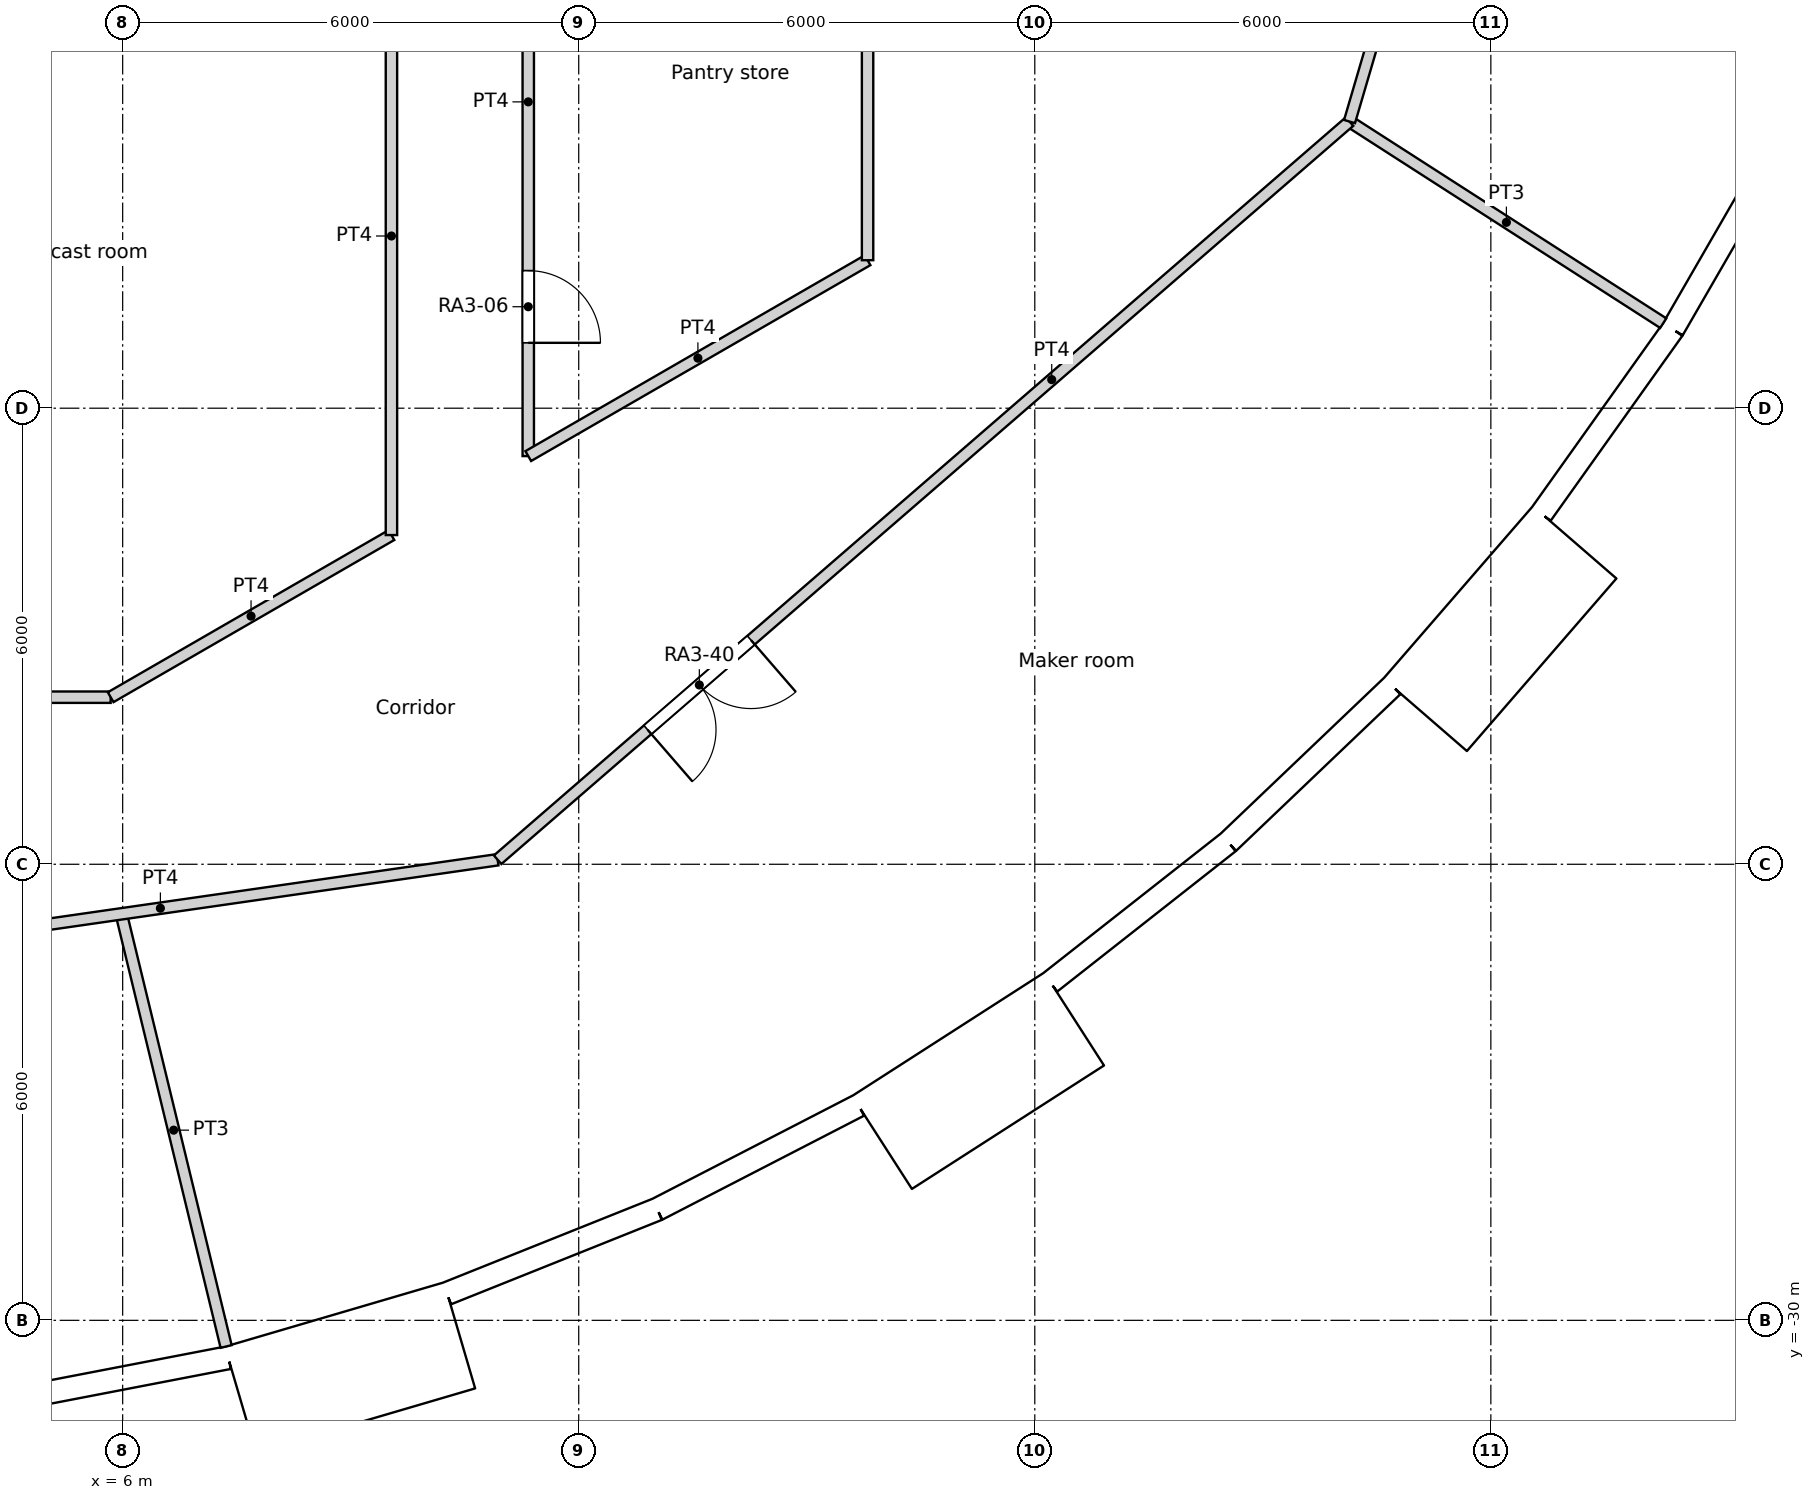
"""IFC4 building model, lengths in metres.
Left out: names, types, materials, properties, quantities, classifications, styles, units other than length and angle.
Written with IfcOpenShell. Run it as: python <this file> out.ifc"""

import sys

from ifc_helpers import new_model, si_unit, direction, frame, frame_2d, origin, origin_2d, place, context, subcontext, project, spatial, rectangle, circle, extrude, element, fill, save


model = new_model("IFC4")
c1 = context("Model", 3, precision=1e-05, world=origin(), true_north=direction((0.0, 1.0)))
c2 = subcontext(c1, "Body", "Model", "MODEL_VIEW")
j1 = project(units=[si_unit("LENGTHUNIT", "METRE"), si_unit("PLANEANGLEUNIT", "RADIAN")], contexts=[c1])
p1 = place(None, origin())
s1 = spatial("IfcSite", under=j1, at=p1, CompositionType="ELEMENT")
p2 = place(p1, origin())
s2 = spatial("IfcBuilding", under=s1, at=p2, CompositionType="ELEMENT")
p3 = place(p2, frame((0.0, 0.0, 49.8)))
s3 = spatial("IfcBuildingStorey", under=s2, at=p3, CompositionType="ELEMENT", Elevation=49.8)
for number, where, z_axis, x_axis in (
    (1, (7.137, -29.421, 0.0), (0.0, 0.0, 1.0), (1.0, 0.0, 0.0)),
    (2, (12.576, -27.539, 0.0), (0.0, 0.0, 1.0), (1.0, 0.0, 0.0)),
    (3, (17.561, -24.661, 0.0), (0.0, 0.0, 1.0), (1.0, 0.0, 0.0)),
    (4, (21.911, -20.892, 0.0), (0.0, 0.0, 1.0), (1.0, 0.0, 0.0)),
    (5, (25.469, -16.368, 0.0), (0.0, 0.0, 1.0), (1.0, 0.0, 0.0)),
):
    element("IfcColumn", number, at=place(p3, frame(where, z_axis=z_axis, x_axis=x_axis)), inside=s3, PredefinedType="COLUMN", context=c2, shape_type="SweptSolid", body=[
        extrude(circle(Radius=0.7, at=origin_2d()), origin(), (0.0, 0.0, 1.0), 3.6),
    ])
for number, where, z_axis, x_axis in (
    (6, (9.723, -22.54, 0.0), (0.0, 0.0, 1.0), (1.0, 0.0, 0.0)),
    (7, (14.659, -19.69, 0.0), (0.0, 0.0, 1.0), (1.0, 0.0, 0.0)),
    (8, (18.805, -15.779, 0.0), (0.0, 0.0, 1.0), (1.0, 0.0, 0.0)),
):
    element("IfcColumn", number, at=place(p3, frame(where, z_axis=z_axis, x_axis=x_axis)), inside=s3, PredefinedType="COLUMN", context=c2, shape_type="SweptSolid", body=[
        extrude(circle(Radius=0.75, at=origin_2d()), origin(), (0.0, 0.0, 1.0), 3.6),
    ])
for number, where, z_axis, x_axis in (
    (9, (6.876, -17.521, 0.0), (0.0, 0.0, 1.0), (1.0, 0.0, 0.0)),
    (10, (11.735, -14.716, 0.0), (0.0, 0.0, 1.0), (1.0, 0.0, 0.0)),
):
    element("IfcColumn", number, at=place(p3, frame(where, z_axis=z_axis, x_axis=x_axis)), inside=s3, PredefinedType="COLUMN", context=c2, shape_type="SweptSolid", body=[
        extrude(circle(Radius=0.8, at=origin_2d()), origin(), (0.0, 0.0, 1.0), 3.6),
    ])
p4 = place(p3, frame((4.465, -31.055, 0.0), z_axis=(0.0, 0.0, 1.0), x_axis=(0.981924535406, 0.189272836848, 0.0)))
e11 = element("IfcWall", 11, at=p4, inside=s3, PredefinedType="SOLIDWALL", context=c2, shape_type="SweptSolid", body=[
    extrude(rectangle(XDim=2.98, YDim=0.3, at=frame_2d((1.49, 0.0))), origin(), (0.0, 0.0, 1.0), 3.15),
])
p5 = place(p4, frame((1.49, 0.0, 1.55)))
e12 = element("IfcOpeningElement", 12, at=p5, cuts=e11, PredefinedType="OPENING", context=c2, shape_type="SweptSolid", body=[
    extrude(circle(Radius=0.9, at=origin_2d()), frame((0.0, 0.16, 0.0), z_axis=(0.0, -1.0, 0.0), x_axis=(1.0, 0.0, 0.0)), (0.0, 0.0, 1.0), 0.32),
])
p6 = place(p3, frame((7.552, -31.044, -0.45), z_axis=(0.0, 0.0, 1.0), x_axis=(0.959489813418, 0.281743319258, 0.0)))
e13 = element("IfcWall", 13, at=p6, inside=s3, PredefinedType="ELEMENTEDWALL", context=c2, shape_type="SweptSolid", body=[
    extrude(rectangle(XDim=3.0, YDim=1.45, at=frame_2d((1.5, 0.0))), origin(), (0.0, 0.0, 1.0), 3.6),
])
p7 = place(p6, frame((1.5, 0.0, 2.0)))
e14 = element("IfcOpeningElement", 14, at=p7, cuts=e13, PredefinedType="OPENING", context=c2, shape_type="SweptSolid", body=[
    extrude(circle(Radius=0.9, at=origin_2d()), frame((0.0, 0.735, 0.0), z_axis=(0.0, -1.0, 0.0), x_axis=(1.0, 0.0, 0.0)), (0.0, 0.0, 1.0), 1.47),
])
p8 = place(p3, frame((10.267, -29.646, 0.0), z_axis=(0.0, 0.0, 1.0), x_axis=(0.928403213937, 0.371574316054, 0.0)))
e15 = element("IfcWall", 15, at=p8, inside=s3, PredefinedType="SOLIDWALL", context=c2, shape_type="SweptSolid", body=[
    extrude(rectangle(XDim=2.98, YDim=0.3, at=frame_2d((1.49, 0.0))), origin(), (0.0, 0.0, 1.0), 3.15),
])
p9 = place(p8, frame((1.49, 0.0, 1.55)))
e16 = element("IfcOpeningElement", 16, at=p9, cuts=e15, PredefinedType="OPENING", context=c2, shape_type="SweptSolid", body=[
    extrude(circle(Radius=0.9, at=origin_2d()), frame((0.0, 0.16, 0.0), z_axis=(0.0, -1.0, 0.0), x_axis=(1.0, 0.0, 0.0)), (0.0, 0.0, 1.0), 0.32),
])
p10 = place(p3, frame((13.033, -28.539, 0.0), z_axis=(0.0, 0.0, 1.0), x_axis=(0.888819853856, 0.458256770153, 0.0)))
e17 = element("IfcWall", 17, at=p10, inside=s3, PredefinedType="SOLIDWALL", context=c2, shape_type="SweptSolid", body=[
    extrude(rectangle(XDim=2.98, YDim=0.3, at=frame_2d((1.49, 0.0))), origin(), (0.0, 0.0, 1.0), 3.15),
])
p11 = place(p10, frame((1.49, 0.0, 1.55)))
e18 = element("IfcOpeningElement", 18, at=p11, cuts=e17, PredefinedType="OPENING", context=c2, shape_type="SweptSolid", body=[
    extrude(circle(Radius=0.9, at=origin_2d()), frame((0.0, 0.16, 0.0), z_axis=(0.0, -1.0, 0.0), x_axis=(1.0, 0.0, 0.0)), (0.0, 0.0, 1.0), 0.32),
])
p12 = place(p3, frame((15.992, -27.659, -0.45), z_axis=(0.0, 0.0, 1.0), x_axis=(0.841223422347, 0.540687667415, 0.0)))
e19 = element("IfcWall", 19, at=p12, inside=s3, PredefinedType="ELEMENTEDWALL", context=c2, shape_type="SweptSolid", body=[
    extrude(rectangle(XDim=3.0, YDim=1.45, at=frame_2d((1.5, 0.0))), origin(), (0.0, 0.0, 1.0), 3.6),
])
p13 = place(p12, frame((1.5, 0.0, 2.0)))
e20 = element("IfcOpeningElement", 20, at=p13, cuts=e19, PredefinedType="OPENING", context=c2, shape_type="SweptSolid", body=[
    extrude(circle(Radius=0.9, at=origin_2d()), frame((0.0, 0.735, 0.0), z_axis=(0.0, -1.0, 0.0), x_axis=(1.0, 0.0, 0.0)), (0.0, 0.0, 1.0), 1.47),
])
p14 = place(p3, frame((18.204, -25.553, 0.0), z_axis=(0.0, 0.0, 1.0), x_axis=(0.786045331304, 0.618168858108, 0.0)))
e21 = element("IfcWall", 21, at=p14, inside=s3, PredefinedType="SOLIDWALL", context=c2, shape_type="SweptSolid", body=[
    extrude(rectangle(XDim=2.98, YDim=0.3, at=frame_2d((1.49, 0.0))), origin(), (0.0, 0.0, 1.0), 3.15),
])
p15 = place(p14, frame((1.49, 0.0, 1.55)))
e22 = element("IfcOpeningElement", 22, at=p15, cuts=e21, PredefinedType="OPENING", context=c2, shape_type="SweptSolid", body=[
    extrude(circle(Radius=0.9, at=origin_2d()), frame((0.0, 0.16, 0.0), z_axis=(0.0, -1.0, 0.0), x_axis=(1.0, 0.0, 0.0)), (0.0, 0.0, 1.0), 0.32),
])
p16 = place(p3, frame((20.546, -23.711, 0.0), z_axis=(0.0, 0.0, 1.0), x_axis=(0.723744206617, 0.690068346896, 0.0)))
e23 = element("IfcWall", 23, at=p16, inside=s3, PredefinedType="SOLIDWALL", context=c2, shape_type="SweptSolid", body=[
    extrude(rectangle(XDim=2.98, YDim=0.3, at=frame_2d((1.49, 0.0))), origin(), (0.0, 0.0, 1.0), 3.15),
])
p17 = place(p16, frame((1.49, 0.0, 1.55)))
e24 = element("IfcOpeningElement", 24, at=p17, cuts=e23, PredefinedType="OPENING", context=c2, shape_type="SweptSolid", body=[
    extrude(circle(Radius=0.9, at=origin_2d()), frame((0.0, 0.16, 0.0), z_axis=(0.0, -1.0, 0.0), x_axis=(1.0, 0.0, 0.0)), (0.0, 0.0, 1.0), 0.32),
])
p18 = place(p3, frame((23.137, -22.033, -0.45), z_axis=(0.0, 0.0, 1.0), x_axis=(0.654890259022, 0.75572398972, 0.0)))
e25 = element("IfcWall", 25, at=p18, inside=s3, PredefinedType="ELEMENTEDWALL", context=c2, shape_type="SweptSolid", body=[
    extrude(rectangle(XDim=3.0, YDim=1.45, at=frame_2d((1.5, 0.0))), origin(), (0.0, 0.0, 1.0), 3.6),
])
p19 = place(p18, frame((1.5, 0.0, 2.0)))
e26 = element("IfcOpeningElement", 26, at=p19, cuts=e25, PredefinedType="OPENING", context=c2, shape_type="SweptSolid", body=[
    extrude(circle(Radius=0.9, at=origin_2d()), frame((0.0, 0.735, 0.0), z_axis=(0.0, -1.0, 0.0), x_axis=(1.0, 0.0, 0.0)), (0.0, 0.0, 1.0), 1.47),
])
p20 = place(p3, frame((24.666, -19.389, 0.0), z_axis=(0.0, 0.0, 1.0), x_axis=(0.580059407678, 0.81457417315, 0.0)))
e27 = element("IfcWall", 27, at=p20, inside=s3, PredefinedType="SOLIDWALL", context=c2, shape_type="SweptSolid", body=[
    extrude(rectangle(XDim=2.979, YDim=0.3, at=frame_2d((1.49, 0.0))), origin(), (0.0, 0.0, 1.0), 3.15),
])
p21 = place(p20, frame((1.49, 0.0, 1.55)))
e28 = element("IfcOpeningElement", 28, at=p21, cuts=e27, PredefinedType="OPENING", context=c2, shape_type="SweptSolid", body=[
    extrude(circle(Radius=0.9, at=origin_2d()), frame((0.0, 0.16, 0.0), z_axis=(0.0, -1.0, 0.0), x_axis=(1.0, 0.0, 0.0)), (0.0, 0.0, 1.0), 0.32),
])
p22 = place(p3, frame((26.394, -16.962, 0.0), z_axis=(0.0, 0.0, 1.0), x_axis=(0.500025049464, 0.866010940986, 0.0)))
e29 = element("IfcWall", 29, at=p22, inside=s3, PredefinedType="SOLIDWALL", context=c2, shape_type="SweptSolid", body=[
    extrude(rectangle(XDim=2.98, YDim=0.3, at=frame_2d((1.49, 0.0))), origin(), (0.0, 0.0, 1.0), 3.15),
])
p23 = place(p22, frame((1.49, 0.0, 1.55)))
e30 = element("IfcOpeningElement", 30, at=p23, cuts=e29, PredefinedType="OPENING", context=c2, shape_type="SweptSolid", body=[
    extrude(circle(Radius=0.9, at=origin_2d()), frame((0.0, 0.16, 0.0), z_axis=(0.0, -1.0, 0.0), x_axis=(1.0, 0.0, 0.0)), (0.0, 0.0, 1.0), 0.32),
])
p24 = place(p3, frame((15.8, -16.053, 0.0), z_axis=(0.0, 0.0, 1.0), x_axis=(0.0, 1.0, 0.0)))
e31 = element("IfcWall", 31, at=p24, inside=s3, PredefinedType="PARTITIONING", context=c2, shape_type="SweptSolid", body=[
    extrude(rectangle(XDim=6.057, YDim=0.15, at=frame_2d((3.028, 0.0))), origin(), (0.0, 0.0, 1.0), 3.15),
])
p25 = place(p3, frame((10.933, -23.94, 0.0), z_axis=(0.0, 0.0, 1.0), x_axis=(0.755770011705, 0.654837147242, 0.0)))
e32 = element("IfcWall", 32, at=p25, inside=s3, PredefinedType="PARTITIONING", context=c2, shape_type="SweptSolid", body=[
    extrude(rectangle(XDim=14.83, YDim=0.15, at=frame_2d((7.415, 0.0))), origin(), (0.0, 0.0, 1.0), 3.15),
])
p26 = place(p25, frame((2.611, 0.0, 0.0)))
e33 = element("IfcOpeningElement", 33, at=p26, cuts=e32, PredefinedType="OPENING", context=c2, shape_type="SweptSolid", body=[
    extrude(rectangle(XDim=1.8, YDim=2.1, at=frame_2d((0.9, 1.05))), frame((0.0, 0.075, 0.0), z_axis=(0.0, -1.0, 0.0), x_axis=(1.0, 0.0, 0.0)), (0.0, 0.0, 1.0), 0.15),
])
p27 = place(p3, frame((22.141, -14.229, 0.0), z_axis=(0.0, 0.0, 1.0), x_axis=(0.281730446162, 0.959493593363, 0.0)))
e34 = element("IfcWall", 34, at=p27, inside=s3, PredefinedType="PARTITIONING", context=c2, shape_type="SweptSolid", body=[
    extrude(rectangle(XDim=14.83, YDim=0.15, at=frame_2d((7.415, 0.0))), origin(), (0.0, 0.0, 1.0), 3.15),
])
p28 = place(p27, frame((6.515, 0.0, 0.0)))
e35 = element("IfcOpeningElement", 35, at=p28, cuts=e34, PredefinedType="OPENING", context=c2, shape_type="SweptSolid", body=[
    extrude(rectangle(XDim=1.0, YDim=2.04, at=frame_2d((0.5, 1.02))), frame((0.0, 0.075, 0.0), z_axis=(0.0, -1.0, 0.0), x_axis=(1.0, 0.0, 0.0)), (0.0, 0.0, 1.0), 0.15),
])
p29 = place(p3, frame((0.608, -21.802, 0.0), z_axis=(0.0, 0.0, 1.0), x_axis=(1.0, 0.0, 0.0)))
e36 = element("IfcWall", 36, at=p29, inside=s3, PredefinedType="PARTITIONING", context=c2, shape_type="SweptSolid", body=[
    extrude(rectangle(XDim=5.234, YDim=0.15, at=frame_2d((2.617, 0.0))), origin(), (0.0, 0.0, 1.0), 3.15),
])
p30 = place(p3, frame((5.842, -21.802, 0.0), z_axis=(0.0, 0.0, 1.0), x_axis=(0.865983505205, 0.500072563448, 0.0)))
e37 = element("IfcWall", 37, at=p30, inside=s3, PredefinedType="PARTITIONING", context=c2, shape_type="SweptSolid", body=[
    extrude(rectangle(XDim=4.265, YDim=0.15, at=frame_2d((2.133, 0.0))), origin(), (0.0, 0.0, 1.0), 3.15),
])
p31 = place(p3, frame((9.536, -19.669, 0.0), z_axis=(0.0, 0.0, 1.0), x_axis=(0.0, 1.0, 0.0)))
e38 = element("IfcWall", 38, at=p31, inside=s3, PredefinedType="PARTITIONING", context=c2, shape_type="SweptSolid", body=[
    extrude(rectangle(XDim=7.869, YDim=0.15, at=frame_2d((3.935, 0.0))), origin(), (0.0, 0.0, 1.0), 3.15),
])
p32 = place(p3, frame((11.336, -18.63, 0.0), z_axis=(0.0, 0.0, 1.0), x_axis=(0.0, 1.0, 0.0)))
e39 = element("IfcWall", 39, at=p32, inside=s3, PredefinedType="PARTITIONING", context=c2, shape_type="SweptSolid", body=[
    extrude(rectangle(XDim=6.83, YDim=0.15, at=frame_2d((3.415, 0.0))), origin(), (0.0, 0.0, 1.0), 3.15),
])
p33 = place(p32, frame((1.49, 0.0, 0.0)))
e40 = element("IfcOpeningElement", 40, at=p33, cuts=e39, PredefinedType="OPENING", context=c2, shape_type="SweptSolid", body=[
    extrude(rectangle(XDim=0.95, YDim=2.1, at=frame_2d((0.475, 1.05))), frame((0.0, 0.075, 0.0), z_axis=(0.0, -1.0, 0.0), x_axis=(1.0, 0.0, 0.0)), (0.0, 0.0, 1.0), 0.15),
])
p34 = place(p3, frame((11.336, -18.63, 0.0), z_axis=(0.0, 0.0, 1.0), x_axis=(0.866063337164, 0.499934291702, 0.0)))
e41 = element("IfcWall", 41, at=p34, inside=s3, PredefinedType="PARTITIONING", context=c2, shape_type="SweptSolid", body=[
    extrude(rectangle(XDim=5.155, YDim=0.15, at=frame_2d((2.577, 0.0))), origin(), (0.0, 0.0, 1.0), 3.15),
])
p35 = place(p3, frame((-3.746, -26.051, 0.0), z_axis=(0.0, 0.0, 1.0), x_axis=(0.989823328782, 0.142301713967, 0.0)))
e42 = element("IfcWall", 42, at=p35, inside=s3, PredefinedType="PARTITIONING", context=c2, shape_type="SweptSolid", body=[
    extrude(rectangle(XDim=14.83, YDim=0.15, at=frame_2d((7.415, 0.0))), origin(), (0.0, 0.0, 1.0), 3.15),
])
p36 = place(p35, frame((4.015, 0.0, 0.0)))
e43 = element("IfcOpeningElement", 43, at=p36, cuts=e42, PredefinedType="OPENING", context=c2, shape_type="SweptSolid", body=[
    extrude(rectangle(XDim=1.8, YDim=2.1, at=frame_2d((0.9, 1.05))), frame((0.0, 0.075, 0.0), z_axis=(0.0, -1.0, 0.0), x_axis=(1.0, 0.0, 0.0)), (0.0, 0.0, 1.0), 0.15),
])
p37 = place(p3, frame((5.981, -24.652, 0.0), z_axis=(0.0, 0.0, 1.0), x_axis=(0.235644168604, -0.971839403298, 0.0)))
e44 = element("IfcWall", 44, at=p37, inside=s3, PredefinedType="PARTITIONING", context=c2, shape_type="SweptSolid", body=[
    extrude(rectangle(XDim=5.857, YDim=0.15, at=frame_2d((2.928, 0.0))), origin(), (0.0, 0.0, 1.0), 3.15),
])
p38 = place(p3, frame((22.141, -14.229, 0.0), z_axis=(0.0, 0.0, 1.0), x_axis=(0.841265781699, -0.540621757371, 0.0)))
e45 = element("IfcWall", 45, at=p38, inside=s3, PredefinedType="PARTITIONING", context=c2, shape_type="SweptSolid", body=[
    extrude(rectangle(XDim=4.906, YDim=0.15, at=frame_2d((2.453, 0.0))), origin(), (0.0, 0.0, 1.0), 3.15),
])
p39 = place(p5, origin())
e46 = element("IfcWindow", 46, at=p39, inside=s3, PartitioningType="SINGLE_PANEL", PredefinedType="WINDOW", context=c2, shape_type="SweptSolid", body=[
    extrude(circle(Radius=0.9, at=origin_2d()), frame((0.0, 0.12, 0.0), z_axis=(0.0, -1.0, 0.0), x_axis=(1.0, 0.0, 0.0)), (0.0, 0.0, 1.0), 0.1),
])
fill(e12, e46)
p40 = place(p7, origin())
e47 = element("IfcWindow", 47, at=p40, inside=s3, PartitioningType="SINGLE_PANEL", PredefinedType="WINDOW", context=c2, shape_type="SweptSolid", body=[
    extrude(circle(Radius=0.9, at=origin_2d()), frame((0.0, 0.695, 0.0), z_axis=(0.0, -1.0, 0.0), x_axis=(1.0, 0.0, 0.0)), (0.0, 0.0, 1.0), 0.1),
])
fill(e14, e47)
p41 = place(p9, origin())
e48 = element("IfcWindow", 48, at=p41, inside=s3, PartitioningType="SINGLE_PANEL", PredefinedType="WINDOW", context=c2, shape_type="SweptSolid", body=[
    extrude(circle(Radius=0.9, at=origin_2d()), frame((0.0, 0.12, 0.0), z_axis=(0.0, -1.0, 0.0), x_axis=(1.0, 0.0, 0.0)), (0.0, 0.0, 1.0), 0.1),
])
fill(e16, e48)
p42 = place(p11, origin())
e49 = element("IfcWindow", 49, at=p42, inside=s3, PartitioningType="SINGLE_PANEL", PredefinedType="WINDOW", context=c2, shape_type="SweptSolid", body=[
    extrude(circle(Radius=0.9, at=origin_2d()), frame((0.0, 0.12, 0.0), z_axis=(0.0, -1.0, 0.0), x_axis=(1.0, 0.0, 0.0)), (0.0, 0.0, 1.0), 0.1),
])
fill(e18, e49)
p43 = place(p13, origin())
e50 = element("IfcWindow", 50, at=p43, inside=s3, PartitioningType="SINGLE_PANEL", PredefinedType="WINDOW", context=c2, shape_type="SweptSolid", body=[
    extrude(circle(Radius=0.9, at=origin_2d()), frame((0.0, 0.695, 0.0), z_axis=(0.0, -1.0, 0.0), x_axis=(1.0, 0.0, 0.0)), (0.0, 0.0, 1.0), 0.1),
])
fill(e20, e50)
p44 = place(p15, origin())
e51 = element("IfcWindow", 51, at=p44, inside=s3, PartitioningType="SINGLE_PANEL", PredefinedType="WINDOW", context=c2, shape_type="SweptSolid", body=[
    extrude(circle(Radius=0.9, at=origin_2d()), frame((0.0, 0.12, 0.0), z_axis=(0.0, -1.0, 0.0), x_axis=(1.0, 0.0, 0.0)), (0.0, 0.0, 1.0), 0.1),
])
fill(e22, e51)
p45 = place(p17, origin())
e52 = element("IfcWindow", 52, at=p45, inside=s3, PartitioningType="SINGLE_PANEL", PredefinedType="WINDOW", context=c2, shape_type="SweptSolid", body=[
    extrude(circle(Radius=0.9, at=origin_2d()), frame((0.0, 0.12, 0.0), z_axis=(0.0, -1.0, 0.0), x_axis=(1.0, 0.0, 0.0)), (0.0, 0.0, 1.0), 0.1),
])
fill(e24, e52)
p46 = place(p19, origin())
e53 = element("IfcWindow", 53, at=p46, inside=s3, PartitioningType="SINGLE_PANEL", PredefinedType="WINDOW", context=c2, shape_type="SweptSolid", body=[
    extrude(circle(Radius=0.9, at=origin_2d()), frame((0.0, 0.695, 0.0), z_axis=(0.0, -1.0, 0.0), x_axis=(1.0, 0.0, 0.0)), (0.0, 0.0, 1.0), 0.1),
])
fill(e26, e53)
p47 = place(p21, origin())
e54 = element("IfcWindow", 54, at=p47, inside=s3, PartitioningType="SINGLE_PANEL", PredefinedType="WINDOW", context=c2, shape_type="SweptSolid", body=[
    extrude(circle(Radius=0.9, at=origin_2d()), frame((0.0, 0.12, 0.0), z_axis=(0.0, -1.0, 0.0), x_axis=(1.0, 0.0, 0.0)), (0.0, 0.0, 1.0), 0.1),
])
fill(e28, e54)
p48 = place(p23, origin())
e55 = element("IfcWindow", 55, at=p48, inside=s3, PartitioningType="SINGLE_PANEL", PredefinedType="WINDOW", context=c2, shape_type="SweptSolid", body=[
    extrude(circle(Radius=0.9, at=origin_2d()), frame((0.0, 0.12, 0.0), z_axis=(0.0, -1.0, 0.0), x_axis=(1.0, 0.0, 0.0)), (0.0, 0.0, 1.0), 0.1),
])
fill(e30, e55)
p49 = place(p33, origin())
e56 = element("IfcDoor", 56, at=p49, inside=s3, OperationType="SINGLE_SWING_RIGHT", PredefinedType="DOOR", context=c2, shape_type="SweptSolid", body=[
    extrude(rectangle(XDim=0.95, YDim=2.1, at=frame_2d((0.475, 1.05))), frame((0.0, 0.025, 0.0), z_axis=(0.0, -1.0, 0.0), x_axis=(1.0, 0.0, 0.0)), (0.0, 0.0, 1.0), 0.05),
])
fill(e40, e56)
p50 = place(p26, origin())
e57 = element("IfcDoor", 57, at=p50, inside=s3, OperationType="DOUBLE_DOOR_SINGLE_SWING", PredefinedType="DOOR", context=c2, shape_type="SweptSolid", body=[
    extrude(rectangle(XDim=1.8, YDim=2.1, at=frame_2d((0.9, 1.05))), frame((0.0, 0.025, 0.0), z_axis=(0.0, -1.0, 0.0), x_axis=(1.0, 0.0, 0.0)), (0.0, 0.0, 1.0), 0.05),
])
fill(e33, e57)
save(model, sys.argv[1])
